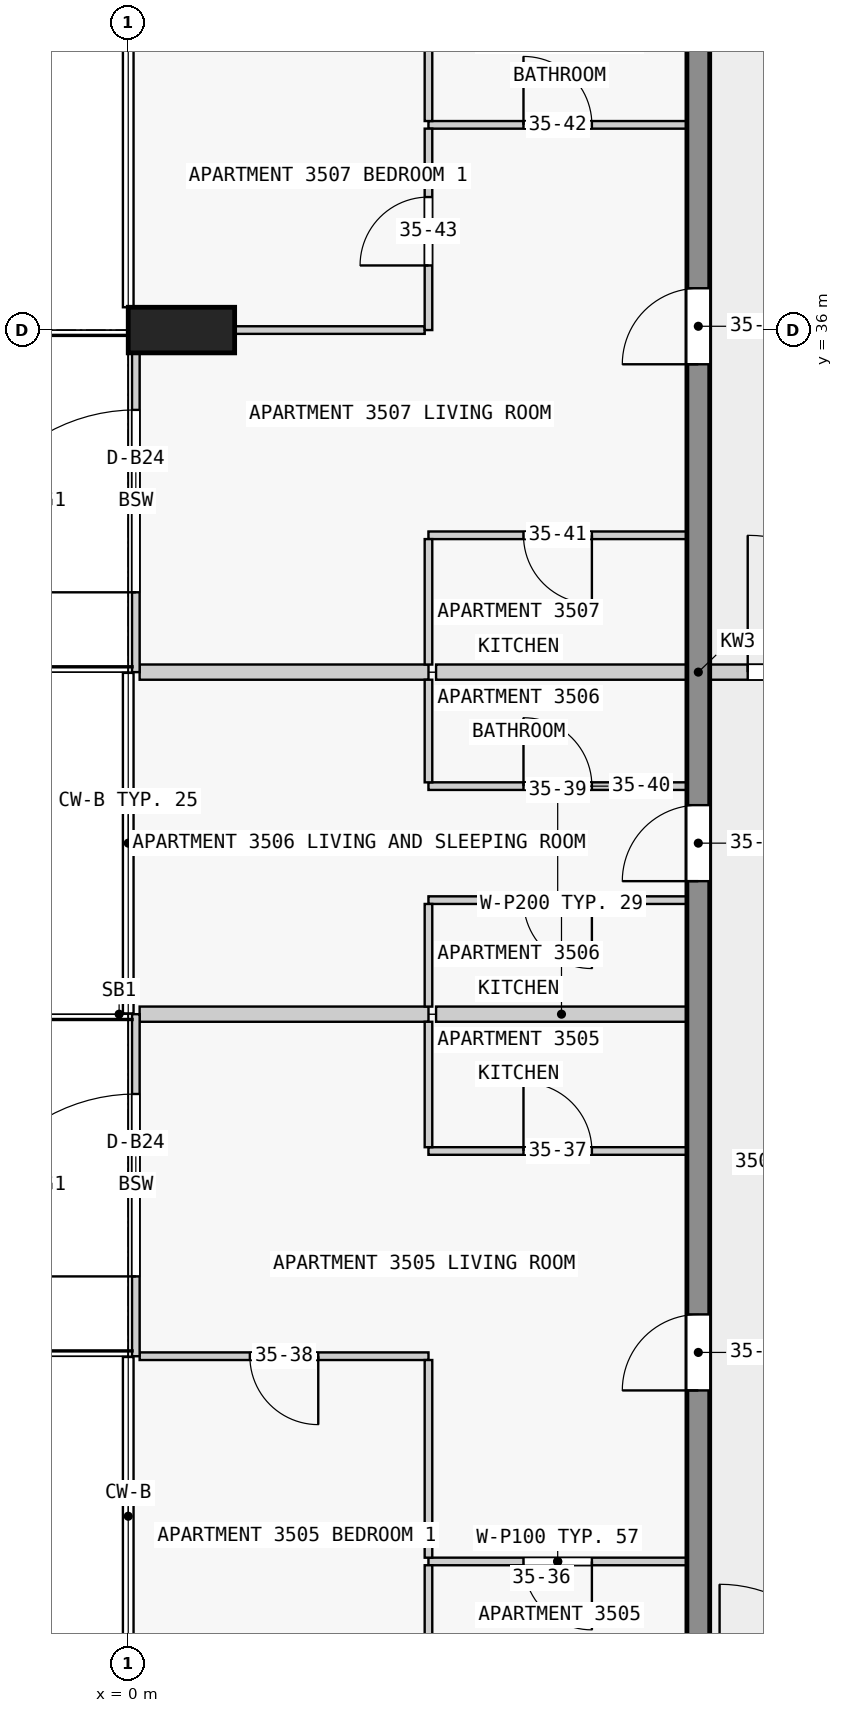
"""IFC4 building model, lengths in metres.
Left out: names, types, materials, properties, quantities, classifications, styles, units other than length and angle.
Written with IfcOpenShell. Run it as: python <this file> out.ifc"""

import sys

from ifc_helpers import new_model, si_unit, direction, frame, frame_2d, origin, origin_2d, place, context, subcontext, project, spatial, rectangle, extrude, element, fill, save


model = new_model("IFC4")
c1 = context("Model", 3, precision=1e-05, world=origin(), true_north=direction((0.0, 1.0)))
c2 = subcontext(c1, "Body", "Model", "MODEL_VIEW")
j1 = project(units=[si_unit("LENGTHUNIT", "METRE"), si_unit("PLANEANGLEUNIT", "RADIAN")], contexts=[c1])
p1 = place(None, origin())
s1 = spatial("IfcSite", under=j1, at=p1, CompositionType="ELEMENT")
p2 = place(p1, origin())
s2 = spatial("IfcBuilding", under=s1, at=p2, CompositionType="ELEMENT")
p3 = place(p2, frame((0.0, 0.0, 139.4)))
s3 = spatial("IfcBuildingStorey", under=s2, at=p3, CompositionType="ELEMENT", Elevation=139.4)
p4 = place(p3, frame((0.7, 36.0, 0.0), z_axis=(0.0, 0.0, 1.0), x_axis=(0.0, 1.0, 0.0)))
e1 = element("IfcColumn", 1, at=p4, inside=s3, PredefinedType="COLUMN", context=c2, shape_type="SweptSolid", body=[
    extrude(rectangle(XDim=0.6, YDim=1.4, at=origin_2d()), origin(), (0.0, 0.0, 1.0), 3.5),
])
p5 = place(p3, frame((7.5, 18.0, 0.0), z_axis=(0.0, 0.0, 1.0), x_axis=(0.0, 1.0, 0.0)))
e2 = element("IfcWall", 2, at=p5, inside=s3, PredefinedType="SHEAR", context=c2, shape_type="SweptSolid", body=[
    extrude(rectangle(XDim=27.0, YDim=0.3, at=frame_2d((13.5, 0.0))), origin(), (0.0, 0.0, 1.0), 3.25),
])
p6 = place(p5, frame((4.05, 0.0, 0.0)))
e3 = element("IfcOpeningElement", 3, at=p6, cuts=e2, PredefinedType="OPENING", context=c2, shape_type="SweptSolid", body=[
    extrude(rectangle(XDim=1.0, YDim=2.1, at=frame_2d((0.5, 1.05))), frame((0.0, 0.16, 0.0), z_axis=(0.0, -1.0, 0.0), x_axis=(1.0, 0.0, 0.0)), (0.0, 0.0, 1.0), 0.32),
])
p7 = place(p5, frame((10.75, 0.0, 0.0)))
e4 = element("IfcOpeningElement", 4, at=p7, cuts=e2, PredefinedType="OPENING", context=c2, shape_type="SweptSolid", body=[
    extrude(rectangle(XDim=1.0, YDim=2.1, at=frame_2d((0.5, 1.05))), frame((0.0, 0.16, 0.0), z_axis=(0.0, -1.0, 0.0), x_axis=(1.0, 0.0, 0.0)), (0.0, 0.0, 1.0), 0.32),
])
p8 = place(p5, frame((17.55, 0.0, 0.0)))
e5 = element("IfcOpeningElement", 5, at=p8, cuts=e2, PredefinedType="OPENING", context=c2, shape_type="SweptSolid", body=[
    extrude(rectangle(XDim=1.0, YDim=2.1, at=frame_2d((0.5, 1.05))), frame((0.0, 0.16, 0.0), z_axis=(0.0, -1.0, 0.0), x_axis=(1.0, 0.0, 0.0)), (0.0, 0.0, 1.0), 0.32),
])
p9 = place(p5, frame((23.25, 0.0, 0.0)))
e6 = element("IfcOpeningElement", 6, at=p9, cuts=e2, PredefinedType="OPENING", context=c2, shape_type="SweptSolid", body=[
    extrude(rectangle(XDim=0.9, YDim=2.1, at=frame_2d((0.45, 1.05))), frame((0.0, 0.16, 0.0), z_axis=(0.0, -1.0, 0.0), x_axis=(1.0, 0.0, 0.0)), (0.0, 0.0, 1.0), 0.32),
])
p10 = place(p5, frame((25.45, 0.0, 0.0)))
e7 = element("IfcOpeningElement", 7, at=p10, cuts=e2, PredefinedType="OPENING", context=c2, shape_type="SweptSolid", body=[
    extrude(rectangle(XDim=1.0, YDim=2.1, at=frame_2d((0.5, 1.05))), frame((0.0, 0.16, 0.0), z_axis=(0.0, -1.0, 0.0), x_axis=(1.0, 0.0, 0.0)), (0.0, 0.0, 1.0), 0.32),
])
p11 = place(p3, frame((0.1, 22.5, 0.0), z_axis=(0.0, 0.0, 1.0), x_axis=(0.0, 1.0, 0.0)))
e8 = element("IfcWall", 8, at=p11, inside=s3, PredefinedType="STANDARD", context=c2, shape_type="SweptSolid", body=[
    extrude(rectangle(XDim=4.5, YDim=0.1, at=frame_2d((2.25, 0.0))), origin(), (0.0, 0.0, 1.0), 3.25),
])
p12 = place(p11, frame((1.05, 0.0, 0.0)))
e9 = element("IfcOpeningElement", 9, at=p12, cuts=e8, PredefinedType="OPENING", context=c2, shape_type="SweptSolid", body=[
    extrude(rectangle(XDim=2.4, YDim=2.4, at=frame_2d((1.2, 1.2))), frame((0.0, 0.06, 0.0), z_axis=(0.0, -1.0, 0.0), x_axis=(1.0, 0.0, 0.0)), (0.0, 0.0, 1.0), 0.12),
])
p13 = place(p3, frame((0.1, 31.5, 0.0), z_axis=(0.0, 0.0, 1.0), x_axis=(0.0, 1.0, 0.0)))
e10 = element("IfcWall", 10, at=p13, inside=s3, PredefinedType="STANDARD", context=c2, shape_type="SweptSolid", body=[
    extrude(rectangle(XDim=4.5, YDim=0.1, at=frame_2d((2.25, 0.0))), origin(), (0.0, 0.0, 1.0), 3.25),
])
p14 = place(p13, frame((1.05, 0.0, 0.0)))
e11 = element("IfcOpeningElement", 11, at=p14, cuts=e10, PredefinedType="OPENING", context=c2, shape_type="SweptSolid", body=[
    extrude(rectangle(XDim=2.4, YDim=2.4, at=frame_2d((1.2, 1.2))), frame((0.0, 0.06, 0.0), z_axis=(0.0, -1.0, 0.0), x_axis=(1.0, 0.0, 0.0)), (0.0, 0.0, 1.0), 0.12),
])
p15 = place(p3, frame((7.35, 19.8, 0.0), z_axis=(0.0, 0.0, 1.0), x_axis=(-1.0, 0.0, 0.0)))
e12 = element("IfcWall", 12, at=p15, inside=s3, PredefinedType="PARTITIONING", context=c2, shape_type="SweptSolid", body=[
    extrude(rectangle(XDim=3.4, YDim=0.1, at=frame_2d((1.7, 0.0))), origin(), (0.0, 0.0, 1.0), 3.25),
])
p16 = place(p15, frame((1.25, 0.0, 0.0)))
e13 = element("IfcOpeningElement", 13, at=p16, cuts=e12, PredefinedType="OPENING", context=c2, shape_type="SweptSolid", body=[
    extrude(rectangle(XDim=0.9, YDim=2.1, at=frame_2d((0.45, 1.05))), frame((0.0, 0.06, 0.0), z_axis=(0.0, -1.0, 0.0), x_axis=(1.0, 0.0, 0.0)), (0.0, 0.0, 1.0), 0.12),
])
p17 = place(p3, frame((3.95, 22.5, 0.0), z_axis=(0.0, 0.0, 1.0), x_axis=(-1.0, 0.0, 0.0)))
e14 = element("IfcWall", 14, at=p17, inside=s3, PredefinedType="PARTITIONING", context=c2, shape_type="SweptSolid", body=[
    extrude(rectangle(XDim=3.8, YDim=0.1, at=frame_2d((1.9, 0.0))), origin(), (0.0, 0.0, 1.0), 3.25),
])
p18 = place(p17, frame((1.45, 0.0, 0.0)))
e15 = element("IfcOpeningElement", 15, at=p18, cuts=e14, PredefinedType="OPENING", context=c2, shape_type="SweptSolid", body=[
    extrude(rectangle(XDim=0.9, YDim=2.1, at=frame_2d((0.45, 1.05))), frame((0.0, 0.06, 0.0), z_axis=(0.0, -1.0, 0.0), x_axis=(1.0, 0.0, 0.0)), (0.0, 0.0, 1.0), 0.12),
])
p19 = place(p3, frame((3.95, 25.2, 0.0), z_axis=(0.0, 0.0, 1.0), x_axis=(1.0, 0.0, 0.0)))
e16 = element("IfcWall", 16, at=p19, inside=s3, PredefinedType="PARTITIONING", context=c2, shape_type="SweptSolid", body=[
    extrude(rectangle(XDim=3.4, YDim=0.1, at=frame_2d((1.7, 0.0))), origin(), (0.0, 0.0, 1.0), 3.25),
])
p20 = place(p19, frame((1.25, 0.0, 0.0)))
e17 = element("IfcOpeningElement", 17, at=p20, cuts=e16, PredefinedType="OPENING", context=c2, shape_type="SweptSolid", body=[
    extrude(rectangle(XDim=0.9, YDim=2.1, at=frame_2d((0.45, 1.05))), frame((0.0, 0.06, 0.0), z_axis=(0.0, -1.0, 0.0), x_axis=(1.0, 0.0, 0.0)), (0.0, 0.0, 1.0), 0.12),
])
p21 = place(p3, frame((7.35, 27.0, 0.0), z_axis=(0.0, 0.0, 1.0), x_axis=(-1.0, 0.0, 0.0)))
e18 = element("IfcWall", 18, at=p21, inside=s3, PredefinedType="PARTITIONING", context=c2, shape_type="SweptSolid", body=[
    extrude(rectangle(XDim=3.3, YDim=0.2, at=frame_2d((1.65, 0.0))), origin(), (0.0, 0.0, 1.0), 3.25),
])
p22 = place(p3, frame((0.15, 27.0, 0.0), z_axis=(0.0, 0.0, 1.0), x_axis=(1.0, 0.0, 0.0)))
e19 = element("IfcWall", 19, at=p22, inside=s3, PredefinedType="PARTITIONING", context=c2, shape_type="SweptSolid", body=[
    extrude(rectangle(XDim=3.8, YDim=0.2, at=frame_2d((1.9, 0.0))), origin(), (0.0, 0.0, 1.0), 3.25),
])
p23 = place(p3, frame((7.35, 28.5, 0.0), z_axis=(0.0, 0.0, 1.0), x_axis=(-1.0, 0.0, 0.0)))
e20 = element("IfcWall", 20, at=p23, inside=s3, PredefinedType="PARTITIONING", context=c2, shape_type="SweptSolid", body=[
    extrude(rectangle(XDim=3.4, YDim=0.1, at=frame_2d((1.7, 0.0))), origin(), (0.0, 0.0, 1.0), 3.25),
])
p24 = place(p23, frame((1.25, 0.0, 0.0)))
e21 = element("IfcOpeningElement", 21, at=p24, cuts=e20, PredefinedType="OPENING", context=c2, shape_type="SweptSolid", body=[
    extrude(rectangle(XDim=0.9, YDim=2.1, at=frame_2d((0.45, 1.05))), frame((0.0, 0.06, 0.0), z_axis=(0.0, -1.0, 0.0), x_axis=(1.0, 0.0, 0.0)), (0.0, 0.0, 1.0), 0.12),
])
p25 = place(p3, frame((3.95, 30.0, 0.0), z_axis=(0.0, 0.0, 1.0), x_axis=(1.0, 0.0, 0.0)))
e22 = element("IfcWall", 22, at=p25, inside=s3, PredefinedType="PARTITIONING", context=c2, shape_type="SweptSolid", body=[
    extrude(rectangle(XDim=3.4, YDim=0.1, at=frame_2d((1.7, 0.0))), origin(), (0.0, 0.0, 1.0), 3.25),
])
p26 = place(p25, frame((1.25, 0.0, 0.0)))
e23 = element("IfcOpeningElement", 23, at=p26, cuts=e22, PredefinedType="OPENING", context=c2, shape_type="SweptSolid", body=[
    extrude(rectangle(XDim=0.9, YDim=2.1, at=frame_2d((0.45, 1.05))), frame((0.0, 0.06, 0.0), z_axis=(0.0, -1.0, 0.0), x_axis=(1.0, 0.0, 0.0)), (0.0, 0.0, 1.0), 0.12),
])
p27 = place(p3, frame((7.35, 31.5, 0.0), z_axis=(0.0, 0.0, 1.0), x_axis=(-1.0, 0.0, 0.0)))
e24 = element("IfcWall", 24, at=p27, inside=s3, PredefinedType="PARTITIONING", context=c2, shape_type="SweptSolid", body=[
    extrude(rectangle(XDim=3.3, YDim=0.2, at=frame_2d((1.65, 0.0))), origin(), (0.0, 0.0, 1.0), 3.25),
])
p28 = place(p3, frame((0.15, 31.5, 0.0), z_axis=(0.0, 0.0, 1.0), x_axis=(1.0, 0.0, 0.0)))
e25 = element("IfcWall", 25, at=p28, inside=s3, PredefinedType="PARTITIONING", context=c2, shape_type="SweptSolid", body=[
    extrude(rectangle(XDim=3.8, YDim=0.2, at=frame_2d((1.9, 0.0))), origin(), (0.0, 0.0, 1.0), 3.25),
])
p29 = place(p3, frame((7.35, 33.3, 0.0), z_axis=(0.0, 0.0, 1.0), x_axis=(-1.0, 0.0, 0.0)))
e26 = element("IfcWall", 26, at=p29, inside=s3, PredefinedType="PARTITIONING", context=c2, shape_type="SweptSolid", body=[
    extrude(rectangle(XDim=3.4, YDim=0.1, at=frame_2d((1.7, 0.0))), origin(), (0.0, 0.0, 1.0), 3.25),
])
p30 = place(p29, frame((1.25, 0.0, 0.0)))
e27 = element("IfcOpeningElement", 27, at=p30, cuts=e26, PredefinedType="OPENING", context=c2, shape_type="SweptSolid", body=[
    extrude(rectangle(XDim=0.9, YDim=2.1, at=frame_2d((0.45, 1.05))), frame((0.0, 0.06, 0.0), z_axis=(0.0, -1.0, 0.0), x_axis=(1.0, 0.0, 0.0)), (0.0, 0.0, 1.0), 0.12),
])
p31 = place(p3, frame((1.4, 36.0, 0.0), z_axis=(0.0, 0.0, 1.0), x_axis=(1.0, 0.0, 0.0)))
e28 = element("IfcWall", 28, at=p31, inside=s3, PredefinedType="PARTITIONING", context=c2, shape_type="SweptSolid", body=[
    extrude(rectangle(XDim=2.5, YDim=0.1, at=frame_2d((1.25, 0.0))), origin(), (0.0, 0.0, 1.0), 3.25),
])
p32 = place(p3, frame((3.95, 38.7, 0.0), z_axis=(0.0, 0.0, 1.0), x_axis=(1.0, 0.0, 0.0)))
e29 = element("IfcWall", 29, at=p32, inside=s3, PredefinedType="PARTITIONING", context=c2, shape_type="SweptSolid", body=[
    extrude(rectangle(XDim=3.4, YDim=0.1, at=frame_2d((1.7, 0.0))), origin(), (0.0, 0.0, 1.0), 3.25),
])
p33 = place(p32, frame((1.25, 0.0, 0.0)))
e30 = element("IfcOpeningElement", 30, at=p33, cuts=e29, PredefinedType="OPENING", context=c2, shape_type="SweptSolid", body=[
    extrude(rectangle(XDim=0.9, YDim=2.1, at=frame_2d((0.45, 1.05))), frame((0.0, 0.06, 0.0), z_axis=(0.0, -1.0, 0.0), x_axis=(1.0, 0.0, 0.0)), (0.0, 0.0, 1.0), 0.12),
])
p34 = place(p3, frame((3.95, 19.75, 0.0), z_axis=(0.0, 0.0, 1.0), x_axis=(0.0, -1.0, 0.0)))
e31 = element("IfcWall", 31, at=p34, inside=s3, PredefinedType="PARTITIONING", context=c2, shape_type="SweptSolid", body=[
    extrude(rectangle(XDim=1.75, YDim=0.1, at=frame_2d((0.875, 0.0))), origin(), (0.0, 0.0, 1.0), 3.25),
])
p35 = place(p3, frame((3.95, 26.9, 0.0), z_axis=(0.0, 0.0, 1.0), x_axis=(0.0, -1.0, 0.0)))
e32 = element("IfcWall", 32, at=p35, inside=s3, PredefinedType="PARTITIONING", context=c2, shape_type="SweptSolid", body=[
    extrude(rectangle(XDim=1.65, YDim=0.1, at=frame_2d((0.825, 0.0))), origin(), (0.0, 0.0, 1.0), 3.25),
])
for number, where, z_axis, x_axis in (
    (33, (3.95, 28.45, 0.0), (0.0, 0.0, 1.0), (0.0, -1.0, 0.0)),
    (34, (3.95, 31.4, 0.0), (0.0, 0.0, 1.0), (0.0, -1.0, 0.0)),
):
    element("IfcWall", number, at=place(p3, frame(where, z_axis=z_axis, x_axis=x_axis)), inside=s3, PredefinedType="PARTITIONING", context=c2, shape_type="SweptSolid", body=[
        extrude(rectangle(XDim=1.35, YDim=0.1, at=frame_2d((0.675, 0.0))), origin(), (0.0, 0.0, 1.0), 3.25),
    ])
for number, where, z_axis, x_axis in (
    (35, (3.95, 33.25, 0.0), (0.0, 0.0, 1.0), (0.0, -1.0, 0.0)),
    (36, (3.95, 40.4, 0.0), (0.0, 0.0, 1.0), (0.0, -1.0, 0.0)),
):
    element("IfcWall", number, at=place(p3, frame(where, z_axis=z_axis, x_axis=x_axis)), inside=s3, PredefinedType="PARTITIONING", context=c2, shape_type="SweptSolid", body=[
        extrude(rectangle(XDim=1.65, YDim=0.1, at=frame_2d((0.825, 0.0))), origin(), (0.0, 0.0, 1.0), 3.25),
    ])
p36 = place(p3, frame((3.95, 19.85, 0.0), z_axis=(0.0, 0.0, 1.0), x_axis=(0.0, 1.0, 0.0)))
e37 = element("IfcWall", 37, at=p36, inside=s3, PredefinedType="PARTITIONING", context=c2, shape_type="SweptSolid", body=[
    extrude(rectangle(XDim=2.6, YDim=0.1, at=frame_2d((1.3, 0.0))), origin(), (0.0, 0.0, 1.0), 3.25),
])
p37 = place(p3, frame((3.95, 36.0, 0.0), z_axis=(0.0, 0.0, 1.0), x_axis=(0.0, 1.0, 0.0)))
e38 = element("IfcWall", 38, at=p37, inside=s3, PredefinedType="PARTITIONING", context=c2, shape_type="SweptSolid", body=[
    extrude(rectangle(XDim=2.65, YDim=0.1, at=frame_2d((1.325, 0.0))), origin(), (0.0, 0.0, 1.0), 3.25),
])
p38 = place(p37, frame((0.85, 0.0, 0.0)))
e39 = element("IfcOpeningElement", 39, at=p38, cuts=e38, PredefinedType="OPENING", context=c2, shape_type="SweptSolid", body=[
    extrude(rectangle(XDim=0.9, YDim=2.1, at=frame_2d((0.45, 1.05))), frame((0.0, 0.06, 0.0), z_axis=(0.0, -1.0, 0.0), x_axis=(1.0, 0.0, 0.0)), (0.0, 0.0, 1.0), 0.12),
])
p39 = place(p3, frame((7.45, 31.5, 0.0), z_axis=(0.0, 0.0, 1.0), x_axis=(1.0, 0.0, 0.0)))
e40 = element("IfcWall", 40, at=p39, inside=s3, PredefinedType="PARTITIONING", context=c2, shape_type="SweptSolid", body=[
    extrude(rectangle(XDim=3.1, YDim=0.2, at=frame_2d((1.55, 0.0))), origin(), (0.0, 0.0, 1.0), 3.25),
])
p40 = place(p39, frame((0.7, 0.0, 0.0)))
e41 = element("IfcOpeningElement", 41, at=p40, cuts=e40, PredefinedType="OPENING", context=c2, shape_type="SweptSolid", body=[
    extrude(rectangle(XDim=1.8, YDim=2.1, at=frame_2d((0.9, 1.05))), frame((0.0, 0.11, 0.0), z_axis=(0.0, -1.0, 0.0), x_axis=(1.0, 0.0, 0.0)), (0.0, 0.0, 1.0), 0.22),
])
p41 = place(p12, origin())
e42 = element("IfcDoor", 42, at=p41, inside=s3, OperationType="SINGLE_SWING_LEFT", PredefinedType="DOOR", context=c2, shape_type="SweptSolid", body=[
    extrude(rectangle(XDim=2.4, YDim=2.4, at=frame_2d((1.2, 1.2))), frame((0.0, 0.025, 0.0), z_axis=(0.0, -1.0, 0.0), x_axis=(1.0, 0.0, 0.0)), (0.0, 0.0, 1.0), 0.05),
])
fill(e9, e42)
p42 = place(p14, origin())
e43 = element("IfcDoor", 43, at=p42, inside=s3, OperationType="SINGLE_SWING_LEFT", PredefinedType="DOOR", context=c2, shape_type="SweptSolid", body=[
    extrude(rectangle(XDim=2.4, YDim=2.4, at=frame_2d((1.2, 1.2))), frame((0.0, 0.025, 0.0), z_axis=(0.0, -1.0, 0.0), x_axis=(1.0, 0.0, 0.0)), (0.0, 0.0, 1.0), 0.05),
])
fill(e11, e43)
p43 = place(p6, origin())
e44 = element("IfcDoor", 44, at=p43, inside=s3, OperationType="SINGLE_SWING_LEFT", PredefinedType="DOOR", context=c2, shape_type="SweptSolid", body=[
    extrude(rectangle(XDim=1.0, YDim=2.1, at=frame_2d((0.5, 1.05))), frame((0.0, 0.025, 0.0), z_axis=(0.0, -1.0, 0.0), x_axis=(1.0, 0.0, 0.0)), (0.0, 0.0, 1.0), 0.05),
])
fill(e3, e44)
p44 = place(p7, origin())
e45 = element("IfcDoor", 45, at=p44, inside=s3, OperationType="SINGLE_SWING_LEFT", PredefinedType="DOOR", context=c2, shape_type="SweptSolid", body=[
    extrude(rectangle(XDim=1.0, YDim=2.1, at=frame_2d((0.5, 1.05))), frame((0.0, 0.025, 0.0), z_axis=(0.0, -1.0, 0.0), x_axis=(1.0, 0.0, 0.0)), (0.0, 0.0, 1.0), 0.05),
])
fill(e4, e45)
p45 = place(p8, origin())
e46 = element("IfcDoor", 46, at=p45, inside=s3, OperationType="SINGLE_SWING_RIGHT", PredefinedType="DOOR", context=c2, shape_type="SweptSolid", body=[
    extrude(rectangle(XDim=1.0, YDim=2.1, at=frame_2d((0.5, 1.05))), frame((0.0, 0.025, 0.0), z_axis=(0.0, -1.0, 0.0), x_axis=(1.0, 0.0, 0.0)), (0.0, 0.0, 1.0), 0.05),
])
fill(e5, e46)
p46 = place(p40, origin())
e47 = element("IfcDoor", 47, at=p46, inside=s3, OperationType="SINGLE_SWING_RIGHT", PredefinedType="DOOR", context=c2, shape_type="SweptSolid", body=[
    extrude(rectangle(XDim=1.8, YDim=2.1, at=frame_2d((0.9, 1.05))), frame((0.0, 0.025, 0.0), z_axis=(0.0, -1.0, 0.0), x_axis=(1.0, 0.0, 0.0)), (0.0, 0.0, 1.0), 0.05),
])
fill(e41, e47)
p47 = place(p16, origin())
e48 = element("IfcDoor", 48, at=p47, inside=s3, OperationType="SINGLE_SWING_RIGHT", PredefinedType="DOOR", context=c2, shape_type="SweptSolid", body=[
    extrude(rectangle(XDim=0.9, YDim=2.1, at=frame_2d((0.45, 1.05))), frame((0.0, 0.025, 0.0), z_axis=(0.0, -1.0, 0.0), x_axis=(1.0, 0.0, 0.0)), (0.0, 0.0, 1.0), 0.05),
])
fill(e13, e48)
p48 = place(p20, origin())
e49 = element("IfcDoor", 49, at=p48, inside=s3, OperationType="SINGLE_SWING_RIGHT", PredefinedType="DOOR", context=c2, shape_type="SweptSolid", body=[
    extrude(rectangle(XDim=0.9, YDim=2.1, at=frame_2d((0.45, 1.05))), frame((0.0, 0.025, 0.0), z_axis=(0.0, -1.0, 0.0), x_axis=(1.0, 0.0, 0.0)), (0.0, 0.0, 1.0), 0.05),
])
fill(e17, e49)
p49 = place(p18, origin())
e50 = element("IfcDoor", 50, at=p49, inside=s3, OperationType="SINGLE_SWING_LEFT", PredefinedType="DOOR", context=c2, shape_type="SweptSolid", body=[
    extrude(rectangle(XDim=0.9, YDim=2.1, at=frame_2d((0.45, 1.05))), frame((0.0, 0.025, 0.0), z_axis=(0.0, -1.0, 0.0), x_axis=(1.0, 0.0, 0.0)), (0.0, 0.0, 1.0), 0.05),
])
fill(e15, e50)
p50 = place(p24, origin())
e51 = element("IfcDoor", 51, at=p50, inside=s3, OperationType="SINGLE_SWING_RIGHT", PredefinedType="DOOR", context=c2, shape_type="SweptSolid", body=[
    extrude(rectangle(XDim=0.9, YDim=2.1, at=frame_2d((0.45, 1.05))), frame((0.0, 0.025, 0.0), z_axis=(0.0, -1.0, 0.0), x_axis=(1.0, 0.0, 0.0)), (0.0, 0.0, 1.0), 0.05),
])
fill(e21, e51)
p51 = place(p26, origin())
e52 = element("IfcDoor", 52, at=p51, inside=s3, OperationType="SINGLE_SWING_RIGHT", PredefinedType="DOOR", context=c2, shape_type="SweptSolid", body=[
    extrude(rectangle(XDim=0.9, YDim=2.1, at=frame_2d((0.45, 1.05))), frame((0.0, 0.025, 0.0), z_axis=(0.0, -1.0, 0.0), x_axis=(1.0, 0.0, 0.0)), (0.0, 0.0, 1.0), 0.05),
])
fill(e23, e52)
p52 = place(p30, origin())
e53 = element("IfcDoor", 53, at=p52, inside=s3, OperationType="SINGLE_SWING_RIGHT", PredefinedType="DOOR", context=c2, shape_type="SweptSolid", body=[
    extrude(rectangle(XDim=0.9, YDim=2.1, at=frame_2d((0.45, 1.05))), frame((0.0, 0.025, 0.0), z_axis=(0.0, -1.0, 0.0), x_axis=(1.0, 0.0, 0.0)), (0.0, 0.0, 1.0), 0.05),
])
fill(e27, e53)
p53 = place(p33, origin())
e54 = element("IfcDoor", 54, at=p53, inside=s3, OperationType="SINGLE_SWING_RIGHT", PredefinedType="DOOR", context=c2, shape_type="SweptSolid", body=[
    extrude(rectangle(XDim=0.9, YDim=2.1, at=frame_2d((0.45, 1.05))), frame((0.0, 0.025, 0.0), z_axis=(0.0, -1.0, 0.0), x_axis=(1.0, 0.0, 0.0)), (0.0, 0.0, 1.0), 0.05),
])
fill(e30, e54)
p54 = place(p38, origin())
e55 = element("IfcDoor", 55, at=p54, inside=s3, OperationType="SINGLE_SWING_LEFT", PredefinedType="DOOR", context=c2, shape_type="SweptSolid", body=[
    extrude(rectangle(XDim=0.9, YDim=2.1, at=frame_2d((0.45, 1.05))), frame((0.0, 0.025, 0.0), z_axis=(0.0, -1.0, 0.0), x_axis=(1.0, 0.0, 0.0)), (0.0, 0.0, 1.0), 0.05),
])
fill(e39, e55)
save(model, sys.argv[1])
